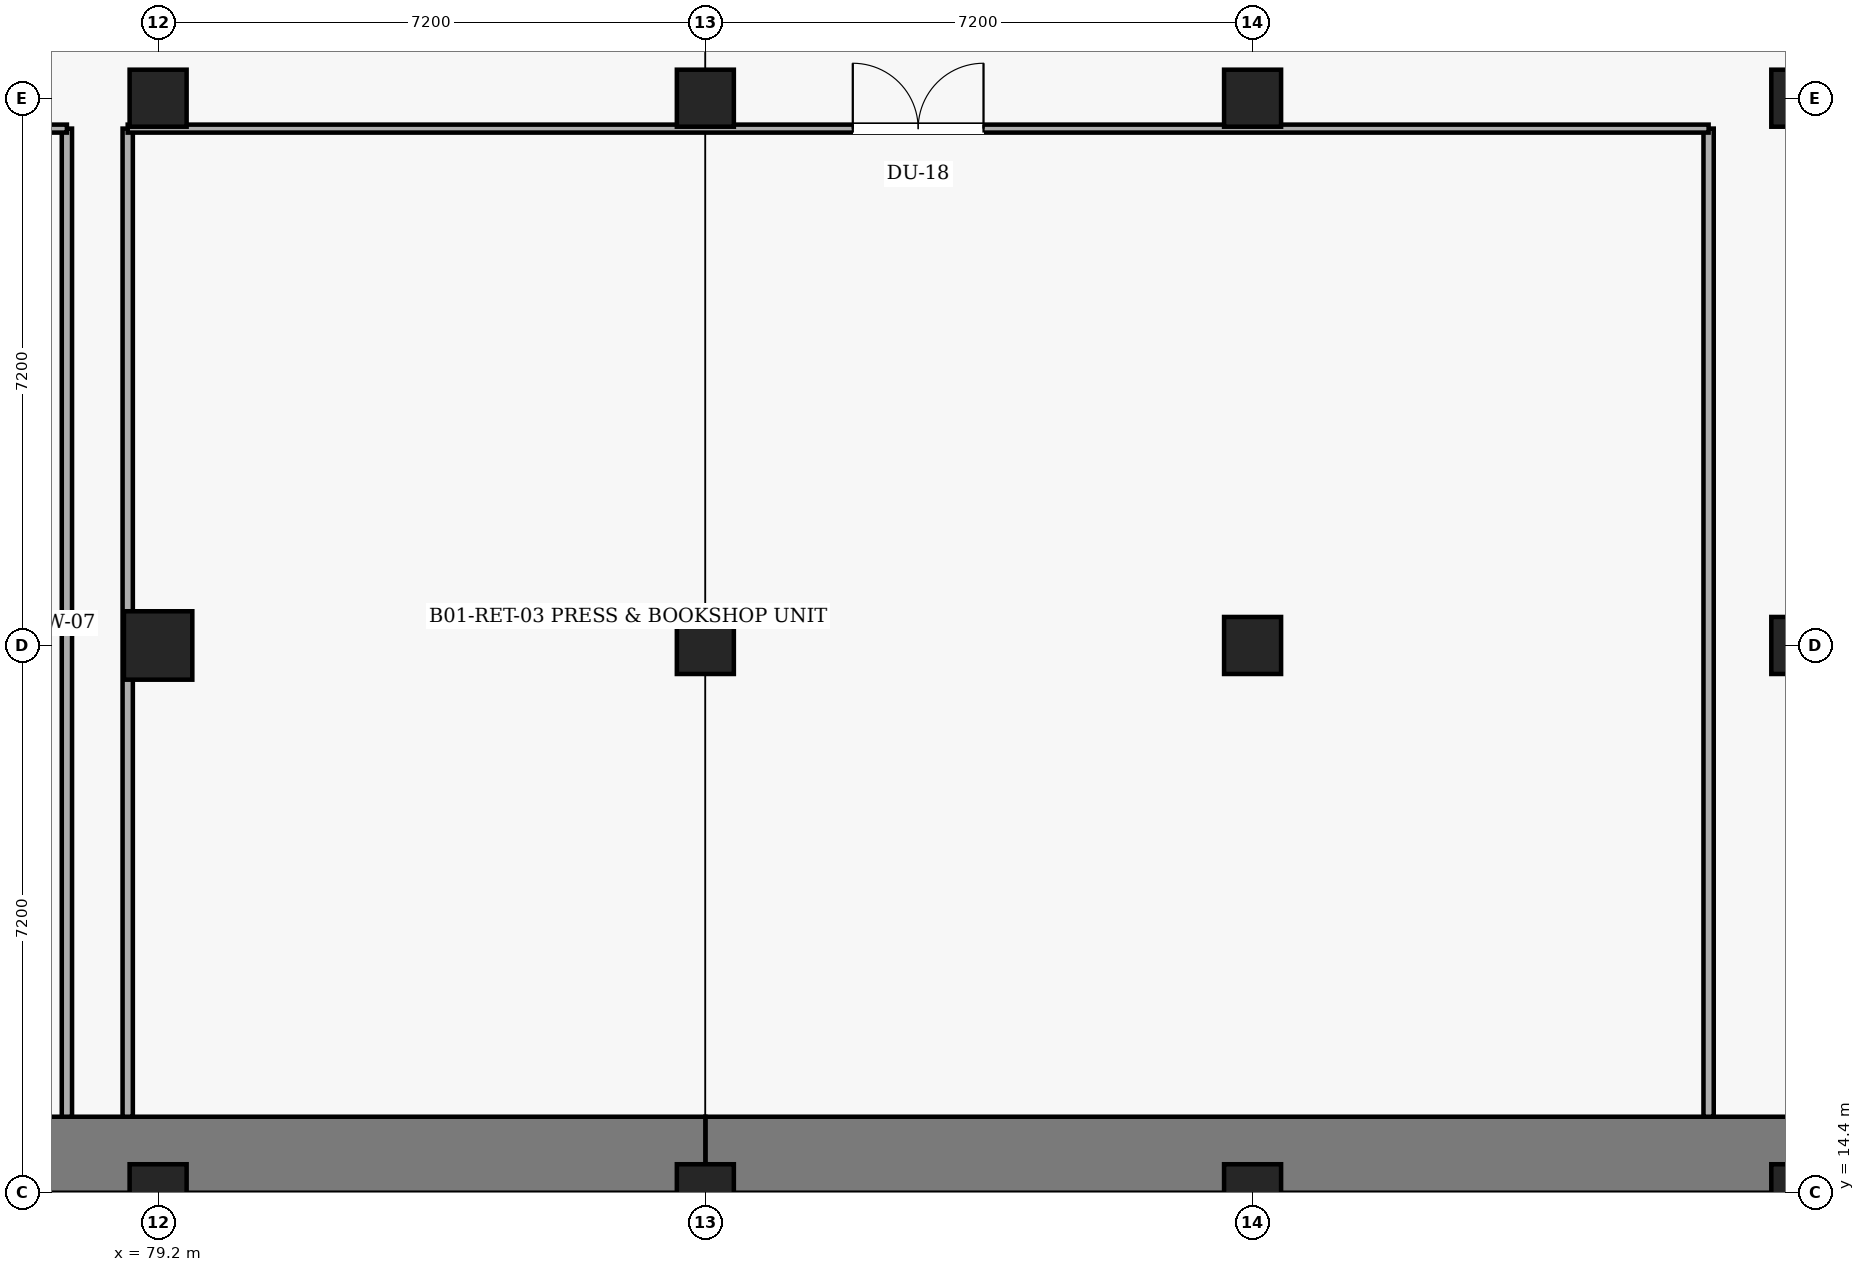
"""IFC4 building model, lengths in metres.
Left out: names, types, materials, properties, quantities, classifications, styles, units other than length and angle.
Written with IfcOpenShell. Run it as: python <this file> out.ifc"""

import sys

from ifc_helpers import new_model, si_unit, direction, frame, frame_2d, origin, origin_2d, place, context, subcontext, project, spatial, rectangle, circle, extrude, element, fill, save


model = new_model("IFC4")
c1 = context("Model", 3, precision=1e-05, world=origin(), true_north=direction((0.0, 1.0)))
c2 = subcontext(c1, "Body", "Model", "MODEL_VIEW")
j1 = project(units=[si_unit("LENGTHUNIT", "METRE"), si_unit("PLANEANGLEUNIT", "RADIAN")], contexts=[c1])
p1 = place(None, origin())
s1 = spatial("IfcSite", under=j1, at=p1, CompositionType="ELEMENT")
p2 = place(p1, origin())
s2 = spatial("IfcBuilding", under=s1, at=p2, CompositionType="ELEMENT")
p3 = place(p2, frame((0.0, 0.0, -5.4)))
s3 = spatial("IfcBuildingStorey", under=s2, at=p3, CompositionType="ELEMENT", Elevation=-5.4)
p4 = place(p3, frame((100.8, 14.9, 0.0), z_axis=(0.0, 0.0, 1.0), x_axis=(-1.0, 0.0, 0.0)))
e1 = element("IfcWall", 1, at=p4, inside=s3, PredefinedType="USERDEFINED", context=c2, shape_type="SweptSolid", body=[
    extrude(rectangle(XDim=14.4, YDim=1.0, at=frame_2d((7.2, 0.0))), origin(), (0.0, 0.0, 1.0), 4.95),
])
p5 = place(p3, frame((86.4, 14.9, 0.0), z_axis=(0.0, 0.0, 1.0), x_axis=(-1.0, 0.0, 0.0)))
e2 = element("IfcWall", 2, at=p5, inside=s3, PredefinedType="USERDEFINED", context=c2, shape_type="SweptSolid", body=[
    extrude(rectangle(XDim=14.4, YDim=1.0, at=frame_2d((7.2, 0.0))), origin(), (0.0, 0.0, 1.0), 4.95),
])
p6 = place(p3, frame((79.2, 14.4, 0.0), z_axis=(0.0, 0.0, 1.0), x_axis=(1.0, 0.0, 0.0)))
e3 = element("IfcColumn", 3, at=p6, inside=s3, PredefinedType="COLUMN", context=c2, shape_type="SweptSolid", body=[
    extrude(rectangle(XDim=0.75, YDim=0.75, at=origin_2d()), origin(), (0.0, 0.0, 1.0), 4.95),
])
p7 = place(p3, frame((79.2, 21.6, 0.0), z_axis=(0.0, 0.0, 1.0), x_axis=(1.0, 0.0, 0.0)))
e4 = element("IfcColumn", 4, at=p7, inside=s3, PredefinedType="COLUMN", context=c2, shape_type="SweptSolid", body=[
    extrude(circle(Radius=0.45, at=origin_2d()), origin(), (0.0, 0.0, 1.0), 4.95),
])
for number, where, z_axis, x_axis in (
    (5, (79.2, 28.8, 0.0), (0.0, 0.0, 1.0), (1.0, 0.0, 0.0)),
    (6, (86.4, 14.4, 0.0), (0.0, 0.0, 1.0), (1.0, 0.0, 0.0)),
    (7, (86.4, 21.6, 0.0), (0.0, 0.0, 1.0), (1.0, 0.0, 0.0)),
    (8, (86.4, 28.8, 0.0), (0.0, 0.0, 1.0), (1.0, 0.0, 0.0)),
    (9, (93.6, 14.4, 0.0), (0.0, 0.0, 1.0), (1.0, 0.0, 0.0)),
    (10, (93.6, 21.6, 0.0), (0.0, 0.0, 1.0), (1.0, 0.0, 0.0)),
    (11, (93.6, 28.8, 0.0), (0.0, 0.0, 1.0), (1.0, 0.0, 0.0)),
    (12, (100.8, 14.4, 0.0), (0.0, 0.0, 1.0), (1.0, 0.0, 0.0)),
    (13, (100.8, 21.6, 0.0), (0.0, 0.0, 1.0), (1.0, 0.0, 0.0)),
    (14, (100.8, 28.8, 0.0), (0.0, 0.0, 1.0), (1.0, 0.0, 0.0)),
):
    element("IfcColumn", number, at=place(p3, frame(where, z_axis=z_axis, x_axis=x_axis)), inside=s3, PredefinedType="COLUMN", context=c2, shape_type="SweptSolid", body=[
        extrude(rectangle(XDim=0.75, YDim=0.75, at=origin_2d()), origin(), (0.0, 0.0, 1.0), 4.95),
    ])
p8 = place(p3, frame((78.0, 28.4, 0.0), z_axis=(0.0, 0.0, 1.0), x_axis=(0.0, -1.0, 0.0)))
e15 = element("IfcWall", 15, at=p8, inside=s3, PredefinedType="PARTITIONING", context=c2, shape_type="SweptSolid", body=[
    extrude(rectangle(XDim=13.0, YDim=0.135, at=frame_2d((6.5, 0.0))), origin(), (0.0, 0.0, 1.0), 4.05),
])
p9 = place(p3, frame((58.2, 28.4, 0.0), z_axis=(0.0, 0.0, 1.0), x_axis=(1.0, 0.0, 0.0)))
e16 = element("IfcWall", 16, at=p9, inside=s3, PredefinedType="PARTITIONING", context=c2, shape_type="SweptSolid", body=[
    extrude(rectangle(XDim=19.8, YDim=0.105, at=frame_2d((9.9, 0.0))), origin(), (0.0, 0.0, 1.0), 4.05),
])
p10 = place(p9, frame((9.04, 0.0, 0.0)))
e17 = element("IfcOpeningElement", 17, at=p10, cuts=e16, PredefinedType="OPENING", context=c2, shape_type="SweptSolid", body=[
    extrude(rectangle(XDim=1.72, YDim=2.22, at=frame_2d((0.86, 1.11))), frame((0.0, 0.062, 0.0), z_axis=(0.0, -1.0, 0.0), x_axis=(1.0, 0.0, 0.0)), (0.0, 0.0, 1.0), 0.125),
])
for number, where, z_axis, x_axis in (
    (18, (99.6, 28.4, 0.0), (0.0, 0.0, 1.0), (0.0, -1.0, 0.0)),
    (19, (78.8, 15.4, 0.0), (0.0, 0.0, 1.0), (0.0, 1.0, 0.0)),
):
    element("IfcWall", number, at=place(p3, frame(where, z_axis=z_axis, x_axis=x_axis)), inside=s3, PredefinedType="PARTITIONING", context=c2, shape_type="SweptSolid", body=[
        extrude(rectangle(XDim=13.0, YDim=0.135, at=frame_2d((6.5, 0.0))), origin(), (0.0, 0.0, 1.0), 4.05),
    ])
p11 = place(p3, frame((78.8, 28.4, 0.0), z_axis=(0.0, 0.0, 1.0), x_axis=(1.0, 0.0, 0.0)))
e20 = element("IfcWall", 20, at=p11, inside=s3, PredefinedType="PARTITIONING", context=c2, shape_type="SweptSolid", body=[
    extrude(rectangle(XDim=20.8, YDim=0.105, at=frame_2d((10.4, 0.0))), origin(), (0.0, 0.0, 1.0), 4.05),
])
p12 = place(p11, frame((9.54, 0.0, 0.0)))
e21 = element("IfcOpeningElement", 21, at=p12, cuts=e20, PredefinedType="OPENING", context=c2, shape_type="SweptSolid", body=[
    extrude(rectangle(XDim=1.72, YDim=2.22, at=frame_2d((0.86, 1.11))), frame((0.0, 0.062, 0.0), z_axis=(0.0, -1.0, 0.0), x_axis=(1.0, 0.0, 0.0)), (0.0, 0.0, 1.0), 0.125),
])
p13 = place(p12, origin())
e22 = element("IfcDoor", 22, at=p13, inside=s3, OperationType="DOUBLE_DOOR_SINGLE_SWING", PredefinedType="DOOR", context=c2, shape_type="SweptSolid", body=[
    extrude(rectangle(XDim=1.72, YDim=2.22, at=frame_2d((0.86, 1.11))), frame((0.0, 0.025, 0.0), z_axis=(0.0, -1.0, 0.0), x_axis=(1.0, 0.0, 0.0)), (0.0, 0.0, 1.0), 0.05),
])
fill(e21, e22)
save(model, sys.argv[1])
